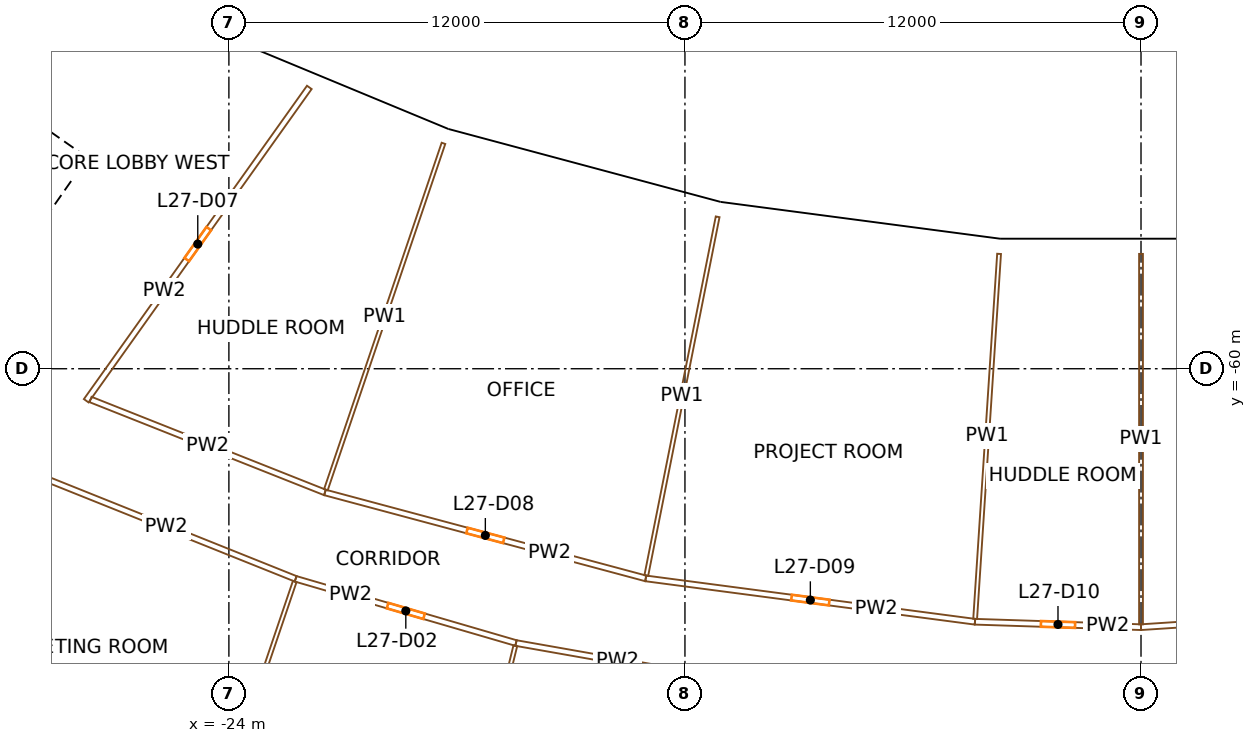
"""IFC4 building model, lengths in metres.
Left out: names, types, materials, properties, quantities, classifications, styles, units other than length and angle.
Written with IfcOpenShell. Run it as: python <this file> out.ifc"""

import sys

from ifc_helpers import new_model, si_unit, direction, frame, frame_2d, origin, origin_2d, place, context, subcontext, project, spatial, rectangle, extrude, element, fill, save


model = new_model("IFC4")
c1 = context("Model", 3, precision=1e-05, world=origin(), true_north=direction((0.0, 1.0)))
c2 = subcontext(c1, "Body", "Model", "MODEL_VIEW")
j1 = project(units=[si_unit("LENGTHUNIT", "METRE"), si_unit("PLANEANGLEUNIT", "RADIAN")], contexts=[c1])
p1 = place(None, origin())
s1 = spatial("IfcSite", under=j1, at=p1, CompositionType="ELEMENT")
p2 = place(p1, origin())
s2 = spatial("IfcBuilding", under=s1, at=p2, CompositionType="ELEMENT")
p3 = place(p2, frame((0.0, 0.0, 121.5)))
s3 = spatial("IfcBuildingStorey", under=s2, at=p3, CompositionType="ELEMENT", Elevation=121.5)
for number, where, z_axis, x_axis in (
    (1, (-25.763, -52.243, 0.0), (0.0, 0.0, 1.0), (0.897, -0.442, 0.0)),
    (2, (-18.724, -55.159, 0.0), (0.0, 0.0, 1.0), (0.947, -0.321, 0.0)),
    (3, (-11.364, -57.131, 0.0), (0.0, 0.0, 1.0), (0.981, -0.195, 0.0)),
    (4, (-3.81, -58.125, 0.0), (0.0, 0.0, 1.0), (0.998, -0.065, 0.0)),
):
    element("IfcColumn", number, at=place(p3, frame(where, z_axis=z_axis, x_axis=x_axis)), inside=s3, PredefinedType="COLUMN", context=c2, shape_type="SweptSolid", body=[
        extrude(rectangle(XDim=1.2, YDim=1.5, at=origin_2d()), origin(), (0.0, 0.0, 1.0), 3.8),
    ])
p4 = place(p3, frame((-36.717, -66.337, 0.0), z_axis=(0.0, 0.0, 1.0), x_axis=(0.573577477574, 0.819151315216, 0.0)))
e5 = element("IfcWall", 5, at=p4, inside=s3, PredefinedType="SHEAR", context=c2, shape_type="SweptSolid", body=[
    extrude(rectangle(XDim=14.8, YDim=0.9, at=frame_2d((7.4, 0.0))), origin(), (0.0, 0.0, 1.0), 3.5),
])
p5 = place(p4, frame((6.2, 0.0, 0.0)))
e6 = element("IfcOpeningElement", 6, at=p5, cuts=e5, PredefinedType="OPENING", context=c2, shape_type="SweptSolid", body=[
    extrude(rectangle(XDim=2.4, YDim=2.1, at=frame_2d((1.2, 1.05))), frame((0.0, 0.46, 0.0), z_axis=(0.0, -1.0, 0.0), x_axis=(1.0, 0.0, 0.0)), (0.0, 0.0, 1.0), 0.92),
])
p6 = place(p3, frame((-28.854, -54.324, 0.0), z_axis=(0.0, 0.0, 1.0), x_axis=(-0.819145767589, 0.573585400304, 0.0)))
e7 = element("IfcWall", 7, at=p6, inside=s3, PredefinedType="SHEAR", context=c2, shape_type="SweptSolid", body=[
    extrude(rectangle(XDim=15.045, YDim=0.9, at=frame_2d((7.523, 0.0))), origin(), (0.0, 0.0, 1.0), 3.5),
])
p7 = place(p6, frame((0.6, 0.0, 0.0)))
e8 = element("IfcOpeningElement", 8, at=p7, cuts=e7, PredefinedType="OPENING", context=c2, shape_type="SweptSolid", body=[
    extrude(rectangle(XDim=1.0, YDim=2.1, at=frame_2d((0.5, 1.05))), frame((0.0, 0.46, 0.0), z_axis=(0.0, -1.0, 0.0), x_axis=(1.0, 0.0, 0.0)), (0.0, 0.0, 1.0), 0.92),
])
p8 = place(p6, frame((3.275, 0.0, 0.0)))
e9 = element("IfcOpeningElement", 9, at=p8, cuts=e7, PredefinedType="OPENING", context=c2, shape_type="SweptSolid", body=[
    extrude(rectangle(XDim=1.0, YDim=2.1, at=frame_2d((0.5, 1.05))), frame((0.0, 0.46, 0.0), z_axis=(0.0, -1.0, 0.0), x_axis=(1.0, 0.0, 0.0)), (0.0, 0.0, 1.0), 0.92),
])
p9 = place(p6, frame((6.225, 0.0, 0.0)))
e10 = element("IfcOpeningElement", 10, at=p9, cuts=e7, PredefinedType="OPENING", context=c2, shape_type="SweptSolid", body=[
    extrude(rectangle(XDim=0.9, YDim=2.1, at=frame_2d((0.45, 1.05))), frame((0.0, 0.46, 0.0), z_axis=(0.0, -1.0, 0.0), x_axis=(1.0, 0.0, 0.0)), (0.0, 0.0, 1.0), 0.92),
])
p10 = place(p6, frame((13.495, 0.0, 0.0)))
e11 = element("IfcOpeningElement", 11, at=p10, cuts=e7, PredefinedType="OPENING", context=c2, shape_type="SweptSolid", body=[
    extrude(rectangle(XDim=1.1, YDim=2.1, at=frame_2d((0.55, 1.05))), frame((0.0, 0.46, 0.0), z_axis=(0.0, -1.0, 0.0), x_axis=(1.0, 0.0, 0.0)), (0.0, 0.0, 1.0), 0.92),
])
p11 = place(p3, frame((-18.267, -53.89, 0.0), z_axis=(0.0, 0.0, 1.0), x_axis=(-0.923879826967, 0.382682721486, 0.0)))
e12 = element("IfcWall", 12, at=p11, inside=s3, PredefinedType="SOLIDWALL", context=c2, shape_type="SweptSolid", body=[
    extrude(rectangle(XDim=7.493, YDim=0.4, at=frame_2d((3.747, 0.0))), origin(), (0.0, 0.0, 1.0), 2.7),
])
p12 = place(p11, frame((4.301, 0.0, 0.9)))
e13 = element("IfcOpeningElement", 13, at=p12, cuts=e12, PredefinedType="OPENING", context=c2, shape_type="SweptSolid", body=[
    extrude(rectangle(XDim=2.6, YDim=1.65, at=frame_2d((1.3, 0.825))), frame((0.0, 0.21, 0.0), z_axis=(0.0, -1.0, 0.0), x_axis=(1.0, 0.0, 0.0)), (0.0, 0.0, 1.0), 0.42),
])
p13 = place(p11, frame((0.592, 0.0, 0.9)))
e14 = element("IfcOpeningElement", 14, at=p13, cuts=e12, PredefinedType="OPENING", context=c2, shape_type="SweptSolid", body=[
    extrude(rectangle(XDim=2.6, YDim=1.65, at=frame_2d((1.3, 0.825))), frame((0.0, 0.21, 0.0), z_axis=(0.0, -1.0, 0.0), x_axis=(1.0, 0.0, 0.0)), (0.0, 0.0, 1.0), 0.42),
])
p14 = place(p3, frame((-11.15, -55.794, 0.0), z_axis=(0.0, 0.0, 1.0), x_axis=(-0.965924597867, 0.258823629594, 0.0)))
e15 = element("IfcWall", 15, at=p14, inside=s3, PredefinedType="SOLIDWALL", context=c2, shape_type="SweptSolid", body=[
    extrude(rectangle(XDim=7.342, YDim=0.4, at=frame_2d((3.671, 0.0))), origin(), (0.0, 0.0, 1.0), 2.7),
])
p15 = place(p14, frame((4.225, 0.0, 0.9)))
e16 = element("IfcOpeningElement", 16, at=p15, cuts=e15, PredefinedType="OPENING", context=c2, shape_type="SweptSolid", body=[
    extrude(rectangle(XDim=2.6, YDim=1.65, at=frame_2d((1.3, 0.825))), frame((0.0, 0.21, 0.0), z_axis=(0.0, -1.0, 0.0), x_axis=(1.0, 0.0, 0.0)), (0.0, 0.0, 1.0), 0.42),
])
p16 = place(p14, frame((0.517, 0.0, 0.9)))
e17 = element("IfcOpeningElement", 17, at=p16, cuts=e15, PredefinedType="OPENING", context=c2, shape_type="SweptSolid", body=[
    extrude(rectangle(XDim=2.6, YDim=1.65, at=frame_2d((1.3, 0.825))), frame((0.0, 0.21, 0.0), z_axis=(0.0, -1.0, 0.0), x_axis=(1.0, 0.0, 0.0)), (0.0, 0.0, 1.0), 0.42),
])
p17 = place(p3, frame((-3.697, -56.782, 0.0), z_axis=(0.0, 0.0, 1.0), x_axis=(-0.991444533306, 0.130528684121, 0.0)))
e18 = element("IfcWall", 18, at=p17, inside=s3, PredefinedType="SOLIDWALL", context=c2, shape_type="SweptSolid", body=[
    extrude(rectangle(XDim=7.493, YDim=0.4, at=frame_2d((3.747, 0.0))), origin(), (0.0, 0.0, 1.0), 2.7),
])
p18 = place(p17, frame((4.301, 0.0, 0.9)))
e19 = element("IfcOpeningElement", 19, at=p18, cuts=e18, PredefinedType="OPENING", context=c2, shape_type="SweptSolid", body=[
    extrude(rectangle(XDim=2.6, YDim=1.65, at=frame_2d((1.3, 0.825))), frame((0.0, 0.21, 0.0), z_axis=(0.0, -1.0, 0.0), x_axis=(1.0, 0.0, 0.0)), (0.0, 0.0, 1.0), 0.42),
])
p19 = place(p17, frame((0.592, 0.0, 0.9)))
e20 = element("IfcOpeningElement", 20, at=p19, cuts=e18, PredefinedType="OPENING", context=c2, shape_type="SweptSolid", body=[
    extrude(rectangle(XDim=2.6, YDim=1.65, at=frame_2d((1.3, 0.825))), frame((0.0, 0.21, 0.0), z_axis=(0.0, -1.0, 0.0), x_axis=(1.0, 0.0, 0.0)), (0.0, 0.0, 1.0), 0.42),
])
p20 = place(p3, frame((3.671, -56.779, 0.0), z_axis=(0.0, 0.0, 1.0), x_axis=(-1.0, 0.0, 0.0)))
e21 = element("IfcWall", 21, at=p20, inside=s3, PredefinedType="SOLIDWALL", context=c2, shape_type="SweptSolid", body=[
    extrude(rectangle(XDim=7.341, YDim=0.4, at=frame_2d((3.671, 0.0))), origin(), (0.0, 0.0, 1.0), 2.7),
])
p21 = place(p20, frame((4.225, 0.0, 0.9)))
e22 = element("IfcOpeningElement", 22, at=p21, cuts=e21, PredefinedType="OPENING", context=c2, shape_type="SweptSolid", body=[
    extrude(rectangle(XDim=2.6, YDim=1.65, at=frame_2d((1.3, 0.825))), frame((0.0, 0.21, 0.0), z_axis=(0.0, -1.0, 0.0), x_axis=(1.0, 0.0, 0.0)), (0.0, 0.0, 1.0), 0.42),
])
p22 = place(p20, frame((0.517, 0.0, 0.9)))
e23 = element("IfcOpeningElement", 23, at=p22, cuts=e21, PredefinedType="OPENING", context=c2, shape_type="SweptSolid", body=[
    extrude(rectangle(XDim=2.6, YDim=1.65, at=frame_2d((1.3, 0.825))), frame((0.0, 0.21, 0.0), z_axis=(0.0, -1.0, 0.0), x_axis=(1.0, 0.0, 0.0)), (0.0, 0.0, 1.0), 0.42),
])
p23 = place(p3, frame((-29.058, -62.799, 0.0), z_axis=(0.0, 0.0, 1.0), x_axis=(0.92834358791, -0.371723261025, 0.0)))
e24 = element("IfcWall", 24, at=p23, inside=s3, PredefinedType="PARTITIONING", context=c2, shape_type="SweptSolid", body=[
    extrude(rectangle(XDim=7.34, YDim=0.15, at=frame_2d((3.67, 0.0))), origin(), (0.0, 0.0, 1.0), 2.4),
])
p24 = place(p3, frame((-27.641, -60.809, 0.0), z_axis=(0.0, 0.0, 1.0), x_axis=(0.929586380114, -0.368604343308, 0.0)))
e25 = element("IfcWall", 25, at=p24, inside=s3, PredefinedType="PARTITIONING", context=c2, shape_type="SweptSolid", body=[
    extrude(rectangle(XDim=6.636, YDim=0.15, at=frame_2d((3.318, 0.0))), origin(), (0.0, 0.0, 1.0), 2.4),
])
p25 = place(p3, frame((-25.426, -74.902, 0.0), z_axis=(0.0, 0.0, 1.0), x_axis=(0.3214264651, 0.94693454237, 0.0)))
e26 = element("IfcWall", 26, at=p25, inside=s3, PredefinedType="PARTITIONING", context=c2, shape_type="SweptSolid", body=[
    extrude(rectangle(XDim=9.825, YDim=0.1, at=frame_2d((4.912, 0.0))), origin(), (0.0, 0.0, 1.0), 2.4),
])
p26 = place(p3, frame((-16.446, -67.217, 0.0), z_axis=(0.0, 0.0, 1.0), x_axis=(-0.960056580345, 0.279805937279, 0.0)))
e27 = element("IfcWall", 27, at=p26, inside=s3, PredefinedType="PARTITIONING", context=c2, shape_type="SweptSolid", body=[
    extrude(rectangle(XDim=6.039, YDim=0.15, at=frame_2d((3.02, 0.0))), origin(), (0.0, 0.0, 1.0), 2.4),
])
p27 = place(p26, frame((2.52, 0.0, 0.0)))
e28 = element("IfcOpeningElement", 28, at=p27, cuts=e27, PredefinedType="OPENING", context=c2, shape_type="SweptSolid", body=[
    extrude(rectangle(XDim=1.0, YDim=2.1, at=frame_2d((0.5, 1.05))), frame((0.0, 0.085, 0.0), z_axis=(0.0, -1.0, 0.0), x_axis=(1.0, 0.0, 0.0)), (0.0, 0.0, 1.0), 0.17),
])
p28 = place(p3, frame((-21.884, -52.598, 0.0), z_axis=(0.0, 0.0, 1.0), x_axis=(-0.580016763963, -0.814604538118, 0.0)))
e29 = element("IfcWall", 29, at=p28, inside=s3, PredefinedType="PARTITIONING", context=c2, shape_type="SweptSolid", body=[
    extrude(rectangle(XDim=10.121, YDim=0.15, at=frame_2d((5.061, 0.0))), origin(), (0.0, 0.0, 1.0), 2.4),
])
p29 = place(p28, frame((4.561, 0.0, 0.0)))
e30 = element("IfcOpeningElement", 30, at=p29, cuts=e29, PredefinedType="OPENING", context=c2, shape_type="SweptSolid", body=[
    extrude(rectangle(XDim=1.0, YDim=2.1, at=frame_2d((0.5, 1.05))), frame((0.0, 0.085, 0.0), z_axis=(0.0, -1.0, 0.0), x_axis=(1.0, 0.0, 0.0)), (0.0, 0.0, 1.0), 0.17),
])
p30 = place(p3, frame((-21.472, -63.255, 0.0), z_axis=(0.0, 0.0, 1.0), x_axis=(0.965927722938, -0.258811966607, 0.0)))
e31 = element("IfcWall", 31, at=p30, inside=s3, PredefinedType="PARTITIONING", context=c2, shape_type="SweptSolid", body=[
    extrude(rectangle(XDim=8.738, YDim=0.15, at=frame_2d((4.369, 0.0))), origin(), (0.0, 0.0, 1.0), 2.4),
])
p31 = place(p30, frame((3.869, 0.0, 0.0)))
e32 = element("IfcOpeningElement", 32, at=p31, cuts=e31, PredefinedType="OPENING", context=c2, shape_type="SweptSolid", body=[
    extrude(rectangle(XDim=1.0, YDim=2.1, at=frame_2d((0.5, 1.05))), frame((0.0, 0.085, 0.0), z_axis=(0.0, -1.0, 0.0), x_axis=(1.0, 0.0, 0.0)), (0.0, 0.0, 1.0), 0.17),
])
p32 = place(p3, frame((-18.763, -76.687, 0.0), z_axis=(0.0, 0.0, 1.0), x_axis=(0.237657357205, 0.971349051869, 0.0)))
e33 = element("IfcWall", 33, at=p32, inside=s3, PredefinedType="PARTITIONING", context=c2, shape_type="SweptSolid", body=[
    extrude(rectangle(XDim=9.674, YDim=0.1, at=frame_2d((4.837, 0.0))), origin(), (0.0, 0.0, 1.0), 2.4),
])
p33 = place(p3, frame((-18.354, -54.07, 0.0), z_axis=(0.0, 0.0, 1.0), x_axis=(-0.321435668314, -0.946931418391, 0.0)))
e34 = element("IfcWall", 34, at=p33, inside=s3, PredefinedType="PARTITIONING", context=c2, shape_type="SweptSolid", body=[
    extrude(rectangle(XDim=9.625, YDim=0.1, at=frame_2d((4.812, 0.0))), origin(), (0.0, 0.0, 1.0), 2.4),
])
p34 = place(p3, frame((-7.532, -68.789, 0.0), z_axis=(0.0, 0.0, 1.0), x_axis=(-0.984813412134, 0.173616080133, 0.0)))
e35 = element("IfcWall", 35, at=p34, inside=s3, PredefinedType="PARTITIONING", context=c2, shape_type="SweptSolid", body=[
    extrude(rectangle(XDim=9.052, YDim=0.15, at=frame_2d((4.526, 0.0))), origin(), (0.0, 0.0, 1.0), 2.4),
])
p35 = place(p34, frame((4.026, 0.0, 0.0)))
e36 = element("IfcOpeningElement", 36, at=p35, cuts=e35, PredefinedType="OPENING", context=c2, shape_type="SweptSolid", body=[
    extrude(rectangle(XDim=1.0, YDim=2.1, at=frame_2d((0.5, 1.05))), frame((0.0, 0.085, 0.0), z_axis=(0.0, -1.0, 0.0), x_axis=(1.0, 0.0, 0.0)), (0.0, 0.0, 1.0), 0.17),
])
p36 = place(p3, frame((-13.032, -65.516, 0.0), z_axis=(0.0, 0.0, 1.0), x_axis=(0.991443260322, -0.130538352841, 0.0)))
e37 = element("IfcWall", 37, at=p36, inside=s3, PredefinedType="PARTITIONING", context=c2, shape_type="SweptSolid", body=[
    extrude(rectangle(XDim=8.738, YDim=0.15, at=frame_2d((4.369, 0.0))), origin(), (0.0, 0.0, 1.0), 2.4),
])
p37 = place(p36, frame((3.869, 0.0, 0.0)))
e38 = element("IfcOpeningElement", 38, at=p37, cuts=e37, PredefinedType="OPENING", context=c2, shape_type="SweptSolid", body=[
    extrude(rectangle(XDim=1.0, YDim=2.1, at=frame_2d((0.5, 1.05))), frame((0.0, 0.085, 0.0), z_axis=(0.0, -1.0, 0.0), x_axis=(1.0, 0.0, 0.0)), (0.0, 0.0, 1.0), 0.17),
])
p38 = place(p3, frame((-11.14, -56.003, 0.0), z_axis=(0.0, 0.0, 1.0), x_axis=(-0.195086769421, -0.980785987052, 0.0)))
e39 = element("IfcWall", 39, at=p38, inside=s3, PredefinedType="PARTITIONING", context=c2, shape_type="SweptSolid", body=[
    extrude(rectangle(XDim=9.625, YDim=0.1, at=frame_2d((4.812, 0.0))), origin(), (0.0, 0.0, 1.0), 2.4),
])
p39 = place(p3, frame((-4.369, -66.657, 0.0), z_axis=(0.0, 0.0, 1.0), x_axis=(0.99946426167, -0.03272903366, 0.0)))
e40 = element("IfcWall", 40, at=p39, inside=s3, PredefinedType="PARTITIONING", context=c2, shape_type="SweptSolid", body=[
    extrude(rectangle(XDim=4.371, YDim=0.15, at=frame_2d((2.186, 0.0))), origin(), (0.0, 0.0, 1.0), 2.4),
])
p40 = place(p39, frame((1.736, 0.0, 0.0)))
e41 = element("IfcOpeningElement", 41, at=p40, cuts=e40, PredefinedType="OPENING", context=c2, shape_type="SweptSolid", body=[
    extrude(rectangle(XDim=0.9, YDim=2.1, at=frame_2d((0.45, 1.05))), frame((0.0, 0.085, 0.0), z_axis=(0.0, -1.0, 0.0), x_axis=(1.0, 0.0, 0.0)), (0.0, 0.0, 1.0), 0.17),
])
p41 = place(p3, frame((-3.735, -56.978, 0.0), z_axis=(0.0, 0.0, 1.0), x_axis=(-0.065392665599, -0.997859609006, 0.0)))
e42 = element("IfcWall", 42, at=p41, inside=s3, PredefinedType="PARTITIONING", context=c2, shape_type="SweptSolid", body=[
    extrude(rectangle(XDim=9.625, YDim=0.1, at=frame_2d((4.812, 0.0))), origin(), (0.0, 0.0, 1.0), 2.4),
])
p42 = place(p3, frame((0.0, -66.8, 0.0), z_axis=(0.0, 0.0, 1.0), x_axis=(0.997858593599, 0.065408158359, 0.0)))
e43 = element("IfcWall", 43, at=p42, inside=s3, PredefinedType="PARTITIONING", context=c2, shape_type="SweptSolid", body=[
    extrude(rectangle(XDim=8.738, YDim=0.15, at=frame_2d((4.369, 0.0))), origin(), (0.0, 0.0, 1.0), 2.4),
])
p43 = place(p42, frame((3.869, 0.0, 0.0)))
e44 = element("IfcOpeningElement", 44, at=p43, cuts=e43, PredefinedType="OPENING", context=c2, shape_type="SweptSolid", body=[
    extrude(rectangle(XDim=1.0, YDim=2.1, at=frame_2d((0.5, 1.05))), frame((0.0, 0.085, 0.0), z_axis=(0.0, -1.0, 0.0), x_axis=(1.0, 0.0, 0.0)), (0.0, 0.0, 1.0), 0.17),
])
p44 = place(p3, frame((0.0, -56.979, 0.0), z_axis=(0.0, 0.0, 1.0), x_axis=(0.0, -1.0, 0.0)))
e45 = element("IfcWall", 45, at=p44, inside=s3, PredefinedType="PARTITIONING", context=c2, shape_type="SweptSolid", body=[
    extrude(rectangle(XDim=9.747, YDim=0.1, at=frame_2d((4.873, 0.0))), origin(), (0.0, 0.0, 1.0), 2.4),
])
p45 = place(p12, origin())
e46 = element("IfcWindow", 46, at=p45, inside=s3, PartitioningType="SINGLE_PANEL", PredefinedType="WINDOW", context=c2, shape_type="SweptSolid", body=[
    extrude(rectangle(XDim=2.6, YDim=1.65, at=frame_2d((1.3, 0.825))), frame((0.0, 0.03, 0.0), z_axis=(0.0, -1.0, 0.0), x_axis=(1.0, 0.0, 0.0)), (0.0, 0.0, 1.0), 0.06),
])
fill(e13, e46)
p46 = place(p13, origin())
e47 = element("IfcWindow", 47, at=p46, inside=s3, PartitioningType="SINGLE_PANEL", PredefinedType="WINDOW", context=c2, shape_type="SweptSolid", body=[
    extrude(rectangle(XDim=2.6, YDim=1.65, at=frame_2d((1.3, 0.825))), frame((0.0, 0.03, 0.0), z_axis=(0.0, -1.0, 0.0), x_axis=(1.0, 0.0, 0.0)), (0.0, 0.0, 1.0), 0.06),
])
fill(e14, e47)
p47 = place(p15, origin())
e48 = element("IfcWindow", 48, at=p47, inside=s3, PartitioningType="SINGLE_PANEL", PredefinedType="WINDOW", context=c2, shape_type="SweptSolid", body=[
    extrude(rectangle(XDim=2.6, YDim=1.65, at=frame_2d((1.3, 0.825))), frame((0.0, 0.03, 0.0), z_axis=(0.0, -1.0, 0.0), x_axis=(1.0, 0.0, 0.0)), (0.0, 0.0, 1.0), 0.06),
])
fill(e16, e48)
p48 = place(p16, origin())
e49 = element("IfcWindow", 49, at=p48, inside=s3, PartitioningType="SINGLE_PANEL", PredefinedType="WINDOW", context=c2, shape_type="SweptSolid", body=[
    extrude(rectangle(XDim=2.6, YDim=1.65, at=frame_2d((1.3, 0.825))), frame((0.0, 0.03, 0.0), z_axis=(0.0, -1.0, 0.0), x_axis=(1.0, 0.0, 0.0)), (0.0, 0.0, 1.0), 0.06),
])
fill(e17, e49)
p49 = place(p18, origin())
e50 = element("IfcWindow", 50, at=p49, inside=s3, PartitioningType="SINGLE_PANEL", PredefinedType="WINDOW", context=c2, shape_type="SweptSolid", body=[
    extrude(rectangle(XDim=2.6, YDim=1.65, at=frame_2d((1.3, 0.825))), frame((0.0, 0.03, 0.0), z_axis=(0.0, -1.0, 0.0), x_axis=(1.0, 0.0, 0.0)), (0.0, 0.0, 1.0), 0.06),
])
fill(e19, e50)
p50 = place(p19, origin())
e51 = element("IfcWindow", 51, at=p50, inside=s3, PartitioningType="SINGLE_PANEL", PredefinedType="WINDOW", context=c2, shape_type="SweptSolid", body=[
    extrude(rectangle(XDim=2.6, YDim=1.65, at=frame_2d((1.3, 0.825))), frame((0.0, 0.03, 0.0), z_axis=(0.0, -1.0, 0.0), x_axis=(1.0, 0.0, 0.0)), (0.0, 0.0, 1.0), 0.06),
])
fill(e20, e51)
p51 = place(p21, origin())
e52 = element("IfcWindow", 52, at=p51, inside=s3, PartitioningType="SINGLE_PANEL", PredefinedType="WINDOW", context=c2, shape_type="SweptSolid", body=[
    extrude(rectangle(XDim=2.6, YDim=1.65, at=frame_2d((1.3, 0.825))), frame((0.0, 0.03, 0.0), z_axis=(0.0, -1.0, 0.0), x_axis=(1.0, 0.0, 0.0)), (0.0, 0.0, 1.0), 0.06),
])
fill(e22, e52)
p52 = place(p22, origin())
e53 = element("IfcWindow", 53, at=p52, inside=s3, PartitioningType="SINGLE_PANEL", PredefinedType="WINDOW", context=c2, shape_type="SweptSolid", body=[
    extrude(rectangle(XDim=2.6, YDim=1.65, at=frame_2d((1.3, 0.825))), frame((0.0, 0.03, 0.0), z_axis=(0.0, -1.0, 0.0), x_axis=(1.0, 0.0, 0.0)), (0.0, 0.0, 1.0), 0.06),
])
fill(e23, e53)
p53 = place(p27, origin())
e54 = element("IfcDoor", 54, at=p53, inside=s3, OperationType="SINGLE_SWING_RIGHT", PredefinedType="DOOR", context=c2, shape_type="SweptSolid", body=[
    extrude(rectangle(XDim=1.0, YDim=2.1, at=frame_2d((0.5, 1.05))), frame((0.0, 0.025, 0.0), z_axis=(0.0, -1.0, 0.0), x_axis=(1.0, 0.0, 0.0)), (0.0, 0.0, 1.0), 0.05),
])
fill(e28, e54)
p54 = place(p29, origin())
e55 = element("IfcDoor", 55, at=p54, inside=s3, OperationType="SINGLE_SWING_RIGHT", PredefinedType="DOOR", context=c2, shape_type="SweptSolid", body=[
    extrude(rectangle(XDim=1.0, YDim=2.1, at=frame_2d((0.5, 1.05))), frame((0.0, 0.025, 0.0), z_axis=(0.0, -1.0, 0.0), x_axis=(1.0, 0.0, 0.0)), (0.0, 0.0, 1.0), 0.05),
])
fill(e30, e55)
p55 = place(p31, origin())
e56 = element("IfcDoor", 56, at=p55, inside=s3, OperationType="SINGLE_SWING_RIGHT", PredefinedType="DOOR", context=c2, shape_type="SweptSolid", body=[
    extrude(rectangle(XDim=1.0, YDim=2.1, at=frame_2d((0.5, 1.05))), frame((0.0, 0.025, 0.0), z_axis=(0.0, -1.0, 0.0), x_axis=(1.0, 0.0, 0.0)), (0.0, 0.0, 1.0), 0.05),
])
fill(e32, e56)
p56 = place(p37, origin())
e57 = element("IfcDoor", 57, at=p56, inside=s3, OperationType="SINGLE_SWING_RIGHT", PredefinedType="DOOR", context=c2, shape_type="SweptSolid", body=[
    extrude(rectangle(XDim=1.0, YDim=2.1, at=frame_2d((0.5, 1.05))), frame((0.0, 0.025, 0.0), z_axis=(0.0, -1.0, 0.0), x_axis=(1.0, 0.0, 0.0)), (0.0, 0.0, 1.0), 0.05),
])
fill(e38, e57)
p57 = place(p40, origin())
e58 = element("IfcDoor", 58, at=p57, inside=s3, OperationType="SINGLE_SWING_RIGHT", PredefinedType="DOOR", context=c2, shape_type="SweptSolid", body=[
    extrude(rectangle(XDim=0.9, YDim=2.1, at=frame_2d((0.45, 1.05))), frame((0.0, 0.025, 0.0), z_axis=(0.0, -1.0, 0.0), x_axis=(1.0, 0.0, 0.0)), (0.0, 0.0, 1.0), 0.05),
])
fill(e41, e58)
save(model, sys.argv[1])
